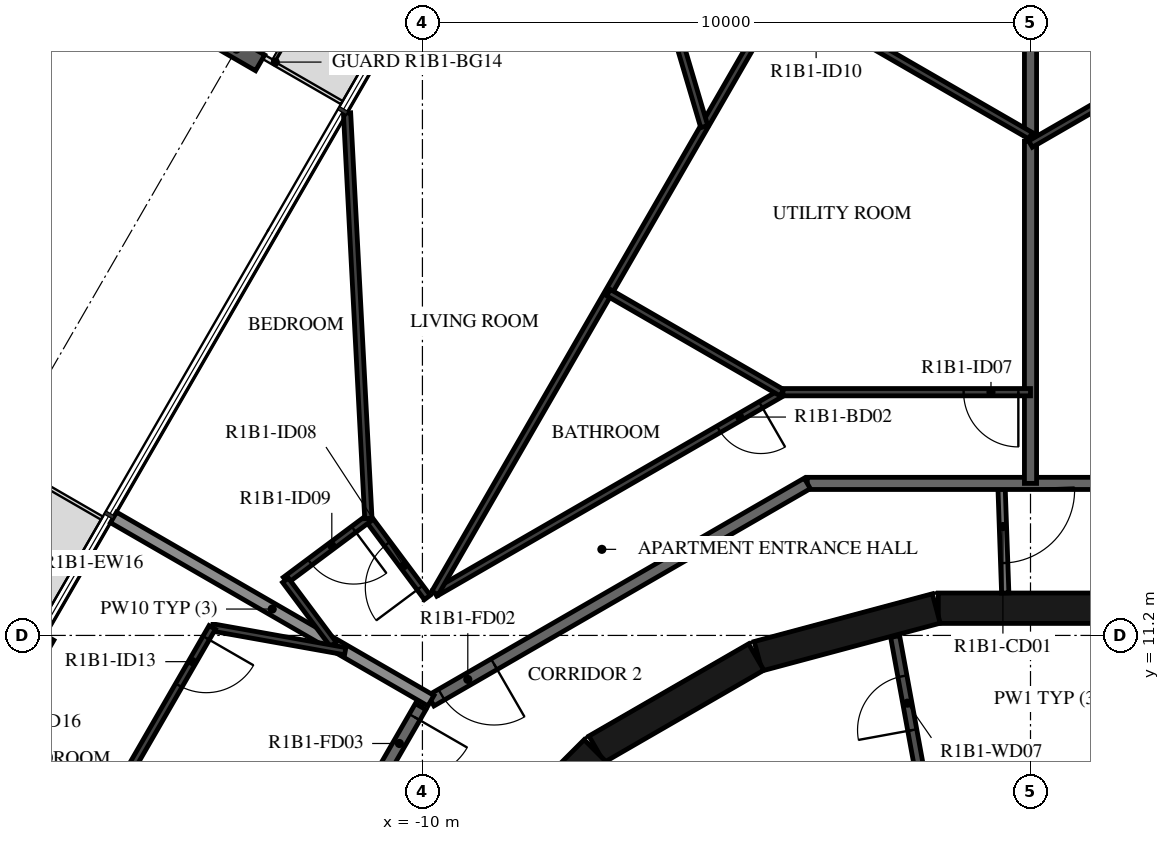
"""IFC4 building model, lengths in metres.
Left out: names, types, materials, properties, quantities, classifications, styles, units other than length and angle.
Written with IfcOpenShell. Run it as: python <this file> out.ifc"""

import sys

from ifc_helpers import new_model, si_unit, direction, frame, frame_2d, origin, origin_2d, place, context, subcontext, project, spatial, rectangle, i_section, extrude, element, fill, save


model = new_model("IFC4")
c1 = context("Model", 3, precision=1e-05, world=origin(), true_north=direction((0.0, 1.0)))
c2 = subcontext(c1, "Body", "Model", "MODEL_VIEW")
j1 = project(units=[si_unit("LENGTHUNIT", "METRE"), si_unit("PLANEANGLEUNIT", "RADIAN")], contexts=[c1])
p1 = place(None, origin())
s1 = spatial("IfcSite", under=j1, at=p1, CompositionType="ELEMENT")
p2 = place(p1, origin())
s2 = spatial("IfcBuilding", under=s1, at=p2, CompositionType="ELEMENT")
p3 = place(p2, frame((0.0, 0.0, 48.9)))
s3 = spatial("IfcBuildingStorey", under=s2, at=p3, CompositionType="ELEMENT", Elevation=48.9)
p4 = place(p3, frame((-13.059, 20.842, -0.38), z_axis=(0.0, 0.0, 1.0), x_axis=(0.50000017485, 0.866025302835, 0.0)))
e1 = element("IfcColumn", 1, at=p4, inside=s3, PredefinedType="COLUMN", context=c2, shape_type="SweptSolid", body=[
    extrude(i_section(OverallWidth=0.3, OverallDepth=0.9, WebThickness=0.019, FlangeThickness=0.035, FilletRadius=0.03, at=origin_2d()), origin(), (0.0, 0.0, 1.0), 3.5),
])
p5 = place(p3, frame((-16.131, 11.161, 0.0), z_axis=(0.0, 0.0, 1.0), x_axis=(-0.500028443584, -0.866008981251, 0.0)))
e2 = element("IfcWall", 2, at=p5, inside=s3, PredefinedType="STANDARD", context=c2, shape_type="SweptSolid", body=[
    extrude(rectangle(XDim=3.2, YDim=0.16, at=frame_2d((1.6, 0.0))), origin(), (0.0, 0.0, 1.0), 3.12),
])
p6 = place(p5, frame((0.4, 0.0, 0.0)))
e3 = element("IfcOpeningElement", 3, at=p6, cuts=e2, PredefinedType="OPENING", context=c2, shape_type="SweptSolid", body=[
    extrude(rectangle(XDim=2.4, YDim=2.4, at=frame_2d((1.2, 1.2))), frame((0.0, 0.09, 0.0), z_axis=(0.0, -1.0, 0.0), x_axis=(1.0, 0.0, 0.0)), (0.0, 0.0, 1.0), 0.18),
])
for number, where, z_axis, x_axis in (
    (4, (1.516, 11.647, 0.0), (0.0, 0.0, 1.0), (-1.0, 0.0, 0.0)),
    (5, (-1.55, 11.643, 0.0), (0.0, 0.0, 1.0), (-0.966, -0.259, 0.0)),
    (6, (-4.51, 10.845, 0.0), (0.0, 0.0, 1.0), (-0.866, -0.5, 0.0)),
):
    element("IfcWall", number, at=place(p3, frame(where, z_axis=z_axis, x_axis=x_axis)), inside=s3, PredefinedType="SHEAR", context=c2, shape_type="SweptSolid", body=[
        extrude(rectangle(XDim=3.033, YDim=0.5, at=frame_2d((1.516, 0.0))), origin(), (0.0, 0.0, 1.0), 3.12),
    ])
p7 = place(p3, frame((-7.164, 9.308, 0.0), z_axis=(0.0, 0.0, 1.0), x_axis=(-0.707106781187, -0.707106781187, 0.0)))
e7 = element("IfcWall", 7, at=p7, inside=s3, PredefinedType="SHEAR", context=c2, shape_type="SweptSolid", body=[
    extrude(rectangle(XDim=3.032, YDim=0.5, at=frame_2d((1.516, 0.0))), origin(), (0.0, 0.0, 1.0), 3.12),
])
p8 = place(p7, frame((1.416, 0.0, 0.0)))
e8 = element("IfcOpeningElement", 8, at=p8, cuts=e7, PredefinedType="OPENING", context=c2, shape_type="SweptSolid", body=[
    extrude(rectangle(XDim=1.2, YDim=2.1, at=frame_2d((0.6, 1.05))), frame((0.0, 0.26, 0.0), z_axis=(0.0, -1.0, 0.0), x_axis=(1.0, 0.0, 0.0)), (0.0, 0.0, 1.0), 0.52),
])
p9 = place(p3, frame((-1.825, 8.99, 0.0), z_axis=(0.0, 0.0, 1.0), x_axis=(-0.179955206115, 0.983674805915, 0.0)))
e9 = element("IfcWall", 9, at=p9, inside=s3, PredefinedType="PARTITIONING", context=c2, shape_type="SweptSolid", body=[
    extrude(rectangle(XDim=2.229, YDim=0.15, at=frame_2d((1.115, 0.0))), origin(), (0.0, 0.0, 1.0), 3.12),
])
p10 = place(p9, frame((0.665, 0.0, 0.0)))
e10 = element("IfcOpeningElement", 10, at=p10, cuts=e9, PredefinedType="OPENING", context=c2, shape_type="SweptSolid", body=[
    extrude(rectangle(XDim=0.9, YDim=2.1, at=frame_2d((0.45, 1.05))), frame((0.0, 0.085, 0.0), z_axis=(0.0, -1.0, 0.0), x_axis=(1.0, 0.0, 0.0)), (0.0, 0.0, 1.0), 0.17),
])
p11 = place(p3, frame((-0.479, 13.7, 0.0), z_axis=(0.0, 0.0, 1.0), x_axis=(0.034919103017, -0.999390142159, 0.0)))
e11 = element("IfcWall", 11, at=p11, inside=s3, PredefinedType="PARTITIONING", context=c2, shape_type="SweptSolid", body=[
    extrude(rectangle(XDim=1.804, YDim=0.12, at=frame_2d((0.902, 0.0))), origin(), (0.0, 0.0, 1.0), 3.12),
])
p12 = place(p11, frame((0.11, 0.0, 0.0)))
e12 = element("IfcOpeningElement", 12, at=p12, cuts=e11, PredefinedType="OPENING", context=c2, shape_type="SweptSolid", body=[
    extrude(rectangle(XDim=1.2, YDim=2.1, at=frame_2d((0.6, 1.05))), frame((0.0, 0.07, 0.0), z_axis=(0.0, -1.0, 0.0), x_axis=(1.0, 0.0, 0.0)), (0.0, 0.0, 1.0), 0.14),
])
p13 = place(p3, frame((3.671, 13.7, 0.0), z_axis=(0.0, 0.0, 1.0), x_axis=(-1.0, 0.0, 0.0)))
e13 = element("IfcWall", 13, at=p13, inside=s3, PredefinedType="STANDARD", context=c2, shape_type="SweptSolid", body=[
    extrude(rectangle(XDim=7.342, YDim=0.2, at=frame_2d((3.671, 0.0))), origin(), (0.0, 0.0, 1.0), 3.12),
])
p14 = place(p3, frame((-3.671, 13.7, 0.0), z_axis=(0.0, 0.0, 1.0), x_axis=(-0.866031419417, -0.499989580474, 0.0)))
e14 = element("IfcWall", 14, at=p14, inside=s3, PredefinedType="STANDARD", context=c2, shape_type="SweptSolid", body=[
    extrude(rectangle(XDim=7.147, YDim=0.2, at=frame_2d((3.573, 0.0))), origin(), (0.0, 0.0, 1.0), 3.12),
])
p15 = place(p14, frame((5.947, 0.0, 0.0)))
e15 = element("IfcOpeningElement", 15, at=p15, cuts=e14, PredefinedType="OPENING", context=c2, shape_type="SweptSolid", body=[
    extrude(rectangle(XDim=1.0, YDim=2.1, at=frame_2d((0.5, 1.05))), frame((0.0, 0.11, 0.0), z_axis=(0.0, -1.0, 0.0), x_axis=(1.0, 0.0, 0.0)), (0.0, 0.0, 1.0), 0.22),
])
p16 = place(p3, frame((-10.029, 10.029, 0.0), z_axis=(0.0, 0.0, 1.0), x_axis=(-0.500001669485, -0.866024439905, 0.0)))
e16 = element("IfcWall", 16, at=p16, inside=s3, PredefinedType="STANDARD", context=c2, shape_type="SweptSolid", body=[
    extrude(rectangle(XDim=7.342, YDim=0.2, at=frame_2d((3.671, 0.0))), origin(), (0.0, 0.0, 1.0), 3.12),
])
p17 = place(p16, frame((0.2, 0.0, 0.0)))
e17 = element("IfcOpeningElement", 17, at=p17, cuts=e16, PredefinedType="OPENING", context=c2, shape_type="SweptSolid", body=[
    extrude(rectangle(XDim=1.0, YDim=2.1, at=frame_2d((0.5, 1.05))), frame((0.0, 0.11, 0.0), z_axis=(0.0, -1.0, 0.0), x_axis=(1.0, 0.0, 0.0)), (0.0, 0.0, 1.0), 0.22),
])
p18 = place(p3, frame((0.0, 19.326, 0.0), z_axis=(0.0, 0.0, 1.0), x_axis=(0.0, -1.0, 0.0)))
e18 = element("IfcWall", 18, at=p18, inside=s3, PredefinedType="STANDARD", context=c2, shape_type="SweptSolid", body=[
    extrude(rectangle(XDim=5.626, YDim=0.2, at=frame_2d((2.813, 0.0))), origin(), (0.0, 0.0, 1.0), 3.12),
])
p19 = place(p3, frame((0.0, 21.81, 0.0), z_axis=(0.0, 0.0, 1.0), x_axis=(0.0, -1.0, 0.0)))
e19 = element("IfcWall", 19, at=p19, inside=s3, PredefinedType="STANDARD", context=c2, shape_type="SweptSolid", body=[
    extrude(rectangle(XDim=2.392, YDim=0.2, at=frame_2d((1.196, 0.0))), origin(), (0.0, 0.0, 1.0), 3.12),
])
p20 = place(p3, frame((-15.08, 13.14, 0.0), z_axis=(0.0, 0.0, 1.0), x_axis=(0.86603112331, -0.49999009336, 0.0)))
e20 = element("IfcWall", 20, at=p20, inside=s3, PredefinedType="STANDARD", context=c2, shape_type="SweptSolid", body=[
    extrude(rectangle(XDim=6.027, YDim=0.2, at=frame_2d((3.014, 0.0))), origin(), (0.0, 0.0, 1.0), 2.73),
])
p21 = place(p3, frame((4.841, 22.075, 0.0), z_axis=(0.0, 0.0, 1.0), x_axis=(-0.866019751484, -0.500009789943, 0.0)))
e21 = element("IfcWall", 21, at=p21, inside=s3, PredefinedType="PARTITIONING", context=c2, shape_type="SweptSolid", body=[
    extrude(rectangle(XDim=5.59, YDim=0.12, at=frame_2d((2.795, 0.0))), origin(), (0.0, 0.0, 1.0), 3.12),
])
p22 = place(p21, frame((0.2, 0.0, 0.0)))
e22 = element("IfcOpeningElement", 22, at=p22, cuts=e21, PredefinedType="OPENING", context=c2, shape_type="SweptSolid", body=[
    extrude(rectangle(XDim=0.9, YDim=2.1, at=frame_2d((0.45, 1.05))), frame((0.0, 0.07, 0.0), z_axis=(0.0, -1.0, 0.0), x_axis=(1.0, 0.0, 0.0)), (0.0, 0.0, 1.0), 0.14),
])
p23 = place(p3, frame((0.0, 15.2, 0.0), z_axis=(0.0, 0.0, 1.0), x_axis=(-1.0, 0.0, 0.0)))
e23 = element("IfcWall", 23, at=p23, inside=s3, PredefinedType="PARTITIONING", context=c2, shape_type="SweptSolid", body=[
    extrude(rectangle(XDim=4.073, YDim=0.12, at=frame_2d((2.036, 0.0))), origin(), (0.0, 0.0, 1.0), 3.12),
])
p24 = place(p23, frame((0.2, 0.0, 0.0)))
e24 = element("IfcOpeningElement", 24, at=p24, cuts=e23, PredefinedType="OPENING", context=c2, shape_type="SweptSolid", body=[
    extrude(rectangle(XDim=0.9, YDim=2.1, at=frame_2d((0.45, 1.05))), frame((0.0, 0.07, 0.0), z_axis=(0.0, -1.0, 0.0), x_axis=(1.0, 0.0, 0.0)), (0.0, 0.0, 1.0), 0.14),
])
p25 = place(p3, frame((-9.92, 11.824, 0.0), z_axis=(0.0, 0.0, 1.0), x_axis=(-0.597853402964, 0.801605456921, 0.0)))
e25 = element("IfcWall", 25, at=p25, inside=s3, PredefinedType="PARTITIONING", context=c2, shape_type="SweptSolid", body=[
    extrude(rectangle(XDim=1.621, YDim=0.12, at=frame_2d((0.811, 0.0))), origin(), (0.0, 0.0, 1.0), 3.12),
])
p26 = place(p25, frame((0.2, 0.0, 0.0)))
e26 = element("IfcOpeningElement", 26, at=p26, cuts=e25, PredefinedType="OPENING", context=c2, shape_type="SweptSolid", body=[
    extrude(rectangle(XDim=0.9, YDim=2.1, at=frame_2d((0.45, 1.05))), frame((0.0, 0.07, 0.0), z_axis=(0.0, -1.0, 0.0), x_axis=(1.0, 0.0, 0.0)), (0.0, 0.0, 1.0), 0.14),
])
p27 = place(p3, frame((-4.088, 15.191, 0.0), z_axis=(0.0, 0.0, 1.0), x_axis=(-0.866024500911, -0.50000156382, 0.0)))
e27 = element("IfcWall", 27, at=p27, inside=s3, PredefinedType="PARTITIONING", context=c2, shape_type="SweptSolid", body=[
    extrude(rectangle(XDim=6.587, YDim=0.12, at=frame_2d((3.294, 0.0))), origin(), (0.0, 0.0, 1.0), 3.12),
])
p28 = place(p27, frame((0.4, 0.0, 0.0)))
e28 = element("IfcOpeningElement", 28, at=p28, cuts=e27, PredefinedType="OPENING", context=c2, shape_type="SweptSolid", body=[
    extrude(rectangle(XDim=0.8, YDim=2.1, at=frame_2d((0.4, 1.05))), frame((0.0, 0.07, 0.0), z_axis=(0.0, -1.0, 0.0), x_axis=(1.0, 0.0, 0.0)), (0.0, 0.0, 1.0), 0.14),
])
p29 = place(p3, frame((-10.889, 13.124, 0.0), z_axis=(0.0, 0.0, 1.0), x_axis=(-0.801616976804, -0.597837956724, 0.0)))
e29 = element("IfcWall", 29, at=p29, inside=s3, PredefinedType="PARTITIONING", context=c2, shape_type="SweptSolid", body=[
    extrude(rectangle(XDim=1.7, YDim=0.12, at=frame_2d((0.85, 0.0))), origin(), (0.0, 0.0, 1.0), 3.12),
])
p30 = place(p29, frame((0.3, 0.0, 0.0)))
e30 = element("IfcOpeningElement", 30, at=p30, cuts=e29, PredefinedType="OPENING", context=c2, shape_type="SweptSolid", body=[
    extrude(rectangle(XDim=0.9, YDim=2.1, at=frame_2d((0.45, 1.05))), frame((0.0, 0.07, 0.0), z_axis=(0.0, -1.0, 0.0), x_axis=(1.0, 0.0, 0.0)), (0.0, 0.0, 1.0), 0.14),
])
p31 = place(p3, frame((-12.252, 12.107, 0.0), z_axis=(0.0, 0.0, 1.0), x_axis=(0.597827926538, -0.801624457119, 0.0)))
e31 = element("IfcWall", 31, at=p31, inside=s3, PredefinedType="PARTITIONING", context=c2, shape_type="SweptSolid", body=[
    extrude(rectangle(XDim=1.314, YDim=0.12, at=frame_2d((0.657, 0.0))), origin(), (0.0, 0.0, 1.0), 3.12),
])
p32 = place(p3, frame((-9.793, 11.897, 0.0), z_axis=(0.0, 0.0, 1.0), x_axis=(0.499981117606, 0.866036305265, 0.0)))
e32 = element("IfcWall", 32, at=p32, inside=s3, PredefinedType="PARTITIONING", context=c2, shape_type="SweptSolid", body=[
    extrude(rectangle(XDim=14.434, YDim=0.12, at=frame_2d((7.217, 0.0))), origin(), (0.0, 0.0, 1.0), 3.12),
])
p33 = place(p32, frame((11.97, 0.0, 0.0)))
e33 = element("IfcOpeningElement", 33, at=p33, cuts=e32, PredefinedType="OPENING", context=c2, shape_type="SweptSolid", body=[
    extrude(rectangle(XDim=0.9, YDim=2.1, at=frame_2d((0.45, 1.05))), frame((0.0, 0.07, 0.0), z_axis=(0.0, -1.0, 0.0), x_axis=(1.0, 0.0, 0.0)), (0.0, 0.0, 1.0), 0.14),
])
p34 = place(p3, frame((-4.088, 21.779, 0.0), z_axis=(0.0, 0.0, 1.0), x_axis=(0.866032292145, -0.49998806882, 0.0)))
e34 = element("IfcWall", 34, at=p34, inside=s3, PredefinedType="PARTITIONING", context=c2, shape_type="SweptSolid", body=[
    extrude(rectangle(XDim=4.721, YDim=0.12, at=frame_2d((2.36, 0.0))), origin(), (0.0, 0.0, 1.0), 3.12),
])
p35 = place(p34, frame((0.2, 0.0, 0.0)))
e35 = element("IfcOpeningElement", 35, at=p35, cuts=e34, PredefinedType="OPENING", context=c2, shape_type="SweptSolid", body=[
    extrude(rectangle(XDim=0.9, YDim=2.1, at=frame_2d((0.45, 1.05))), frame((0.0, 0.07, 0.0), z_axis=(0.0, -1.0, 0.0), x_axis=(1.0, 0.0, 0.0)), (0.0, 0.0, 1.0), 0.14),
])
p36 = place(p3, frame((-6.941, 16.838, 0.0), z_axis=(0.0, 0.0, 1.0), x_axis=(0.866017718408, -0.500013311227, 0.0)))
e36 = element("IfcWall", 36, at=p36, inside=s3, PredefinedType="PARTITIONING", context=c2, shape_type="SweptSolid", body=[
    extrude(rectangle(XDim=3.294, YDim=0.12, at=frame_2d((1.647, 0.0))), origin(), (0.0, 0.0, 1.0), 3.12),
])
p37 = place(p3, frame((-7.4, 26.443, 0.0), z_axis=(0.0, 0.0, 1.0), x_axis=(0.283756762476, -0.958896292489, 0.0)))
e37 = element("IfcWall", 37, at=p37, inside=s3, PredefinedType="PARTITIONING", context=c2, shape_type="SweptSolid", body=[
    extrude(rectangle(XDim=7.17, YDim=0.12, at=frame_2d((3.585, 0.0))), origin(), (0.0, 0.0, 1.0), 3.12),
])
p38 = place(p3, frame((-11.24, 19.792, 0.0), z_axis=(0.0, 0.0, 1.0), x_axis=(0.052579943632, -0.998616718029, 0.0)))
e38 = element("IfcWall", 38, at=p38, inside=s3, PredefinedType="PARTITIONING", context=c2, shape_type="SweptSolid", body=[
    extrude(rectangle(XDim=6.677, YDim=0.12, at=frame_2d((3.338, 0.0))), origin(), (0.0, 0.0, 1.0), 3.12),
])
p39 = place(p3, frame((-11.27, 10.94, 0.0), z_axis=(0.0, 0.0, 1.0), x_axis=(-0.984382718707, 0.176041651637, 0.0)))
e39 = element("IfcWall", 39, at=p39, inside=s3, PredefinedType="PARTITIONING", context=c2, shape_type="SweptSolid", body=[
    extrude(rectangle(XDim=2.222, YDim=0.12, at=frame_2d((1.111, 0.0))), origin(), (0.0, 0.0, 1.0), 3.12),
])
p40 = place(p3, frame((-13.457, 11.332, 0.0), z_axis=(0.0, 0.0, 1.0), x_axis=(-0.499974350878, -0.866040211805, 0.0)))
e40 = element("IfcWall", 40, at=p40, inside=s3, PredefinedType="PARTITIONING", context=c2, shape_type="SweptSolid", body=[
    extrude(rectangle(XDim=3.3, YDim=0.12, at=frame_2d((1.65, 0.0))), origin(), (0.0, 0.0, 1.0), 3.12),
])
p41 = place(p40, frame((0.2, 0.0, 0.0)))
e41 = element("IfcOpeningElement", 41, at=p41, cuts=e40, PredefinedType="OPENING", context=c2, shape_type="SweptSolid", body=[
    extrude(rectangle(XDim=0.9, YDim=2.1, at=frame_2d((0.45, 1.05))), frame((0.0, 0.07, 0.0), z_axis=(0.0, -1.0, 0.0), x_axis=(1.0, 0.0, 0.0)), (0.0, 0.0, 1.0), 0.14),
])
p42 = place(p10, origin())
e42 = element("IfcDoor", 42, at=p42, inside=s3, OperationType="SINGLE_SWING_RIGHT", PredefinedType="DOOR", context=c2, shape_type="SweptSolid", body=[
    extrude(rectangle(XDim=0.9, YDim=2.1, at=frame_2d((0.45, 1.05))), frame((0.0, 0.025, 0.0), z_axis=(0.0, -1.0, 0.0), x_axis=(1.0, 0.0, 0.0)), (0.0, 0.0, 1.0), 0.05),
])
fill(e10, e42)
p43 = place(p15, origin())
e43 = element("IfcDoor", 43, at=p43, inside=s3, OperationType="SINGLE_SWING_LEFT", PredefinedType="DOOR", context=c2, shape_type="SweptSolid", body=[
    extrude(rectangle(XDim=1.0, YDim=2.1, at=frame_2d((0.5, 1.05))), frame((0.0, 0.025, 0.0), z_axis=(0.0, -1.0, 0.0), x_axis=(1.0, 0.0, 0.0)), (0.0, 0.0, 1.0), 0.05),
])
fill(e15, e43)
p44 = place(p24, origin())
e44 = element("IfcDoor", 44, at=p44, inside=s3, OperationType="SINGLE_SWING_RIGHT", PredefinedType="DOOR", context=c2, shape_type="SweptSolid", body=[
    extrude(rectangle(XDim=0.9, YDim=2.1, at=frame_2d((0.45, 1.05))), frame((0.0, 0.025, 0.0), z_axis=(0.0, -1.0, 0.0), x_axis=(1.0, 0.0, 0.0)), (0.0, 0.0, 1.0), 0.05),
])
fill(e24, e44)
p45 = place(p26, origin())
e45 = element("IfcDoor", 45, at=p45, inside=s3, OperationType="SINGLE_SWING_RIGHT", PredefinedType="DOOR", context=c2, shape_type="SweptSolid", body=[
    extrude(rectangle(XDim=0.9, YDim=2.1, at=frame_2d((0.45, 1.05))), frame((0.0, 0.025, 0.0), z_axis=(0.0, -1.0, 0.0), x_axis=(1.0, 0.0, 0.0)), (0.0, 0.0, 1.0), 0.05),
])
fill(e26, e45)
p46 = place(p28, origin())
e46 = element("IfcDoor", 46, at=p46, inside=s3, OperationType="SINGLE_SWING_LEFT", PredefinedType="DOOR", context=c2, shape_type="SweptSolid", body=[
    extrude(rectangle(XDim=0.8, YDim=2.1, at=frame_2d((0.4, 1.05))), frame((0.0, 0.025, 0.0), z_axis=(0.0, -1.0, 0.0), x_axis=(1.0, 0.0, 0.0)), (0.0, 0.0, 1.0), 0.05),
])
fill(e28, e46)
p47 = place(p30, origin())
e47 = element("IfcDoor", 47, at=p47, inside=s3, OperationType="SINGLE_SWING_LEFT", PredefinedType="DOOR", context=c2, shape_type="SweptSolid", body=[
    extrude(rectangle(XDim=0.9, YDim=2.1, at=frame_2d((0.45, 1.05))), frame((0.0, 0.025, 0.0), z_axis=(0.0, -1.0, 0.0), x_axis=(1.0, 0.0, 0.0)), (0.0, 0.0, 1.0), 0.05),
])
fill(e30, e47)
p48 = place(p17, origin())
e48 = element("IfcDoor", 48, at=p48, inside=s3, OperationType="SINGLE_SWING_LEFT", PredefinedType="DOOR", context=c2, shape_type="SweptSolid", body=[
    extrude(rectangle(XDim=1.0, YDim=2.1, at=frame_2d((0.5, 1.05))), frame((0.0, 0.025, 0.0), z_axis=(0.0, -1.0, 0.0), x_axis=(1.0, 0.0, 0.0)), (0.0, 0.0, 1.0), 0.05),
])
fill(e17, e48)
p49 = place(p41, origin())
e49 = element("IfcDoor", 49, at=p49, inside=s3, OperationType="SINGLE_SWING_LEFT", PredefinedType="DOOR", context=c2, shape_type="SweptSolid", body=[
    extrude(rectangle(XDim=0.9, YDim=2.1, at=frame_2d((0.45, 1.05))), frame((0.0, 0.025, 0.0), z_axis=(0.0, -1.0, 0.0), x_axis=(1.0, 0.0, 0.0)), (0.0, 0.0, 1.0), 0.05),
])
fill(e41, e49)
p50 = place(p12, origin())
e50 = element("IfcDoor", 50, at=p50, inside=s3, OperationType="DOUBLE_DOOR_SINGLE_SWING", PredefinedType="DOOR", context=c2, shape_type="SweptSolid", body=[
    extrude(rectangle(XDim=1.2, YDim=2.1, at=frame_2d((0.6, 1.05))), frame((0.0, 0.025, 0.0), z_axis=(0.0, -1.0, 0.0), x_axis=(1.0, 0.0, 0.0)), (0.0, 0.0, 1.0), 0.05),
])
fill(e12, e50)
save(model, sys.argv[1])
